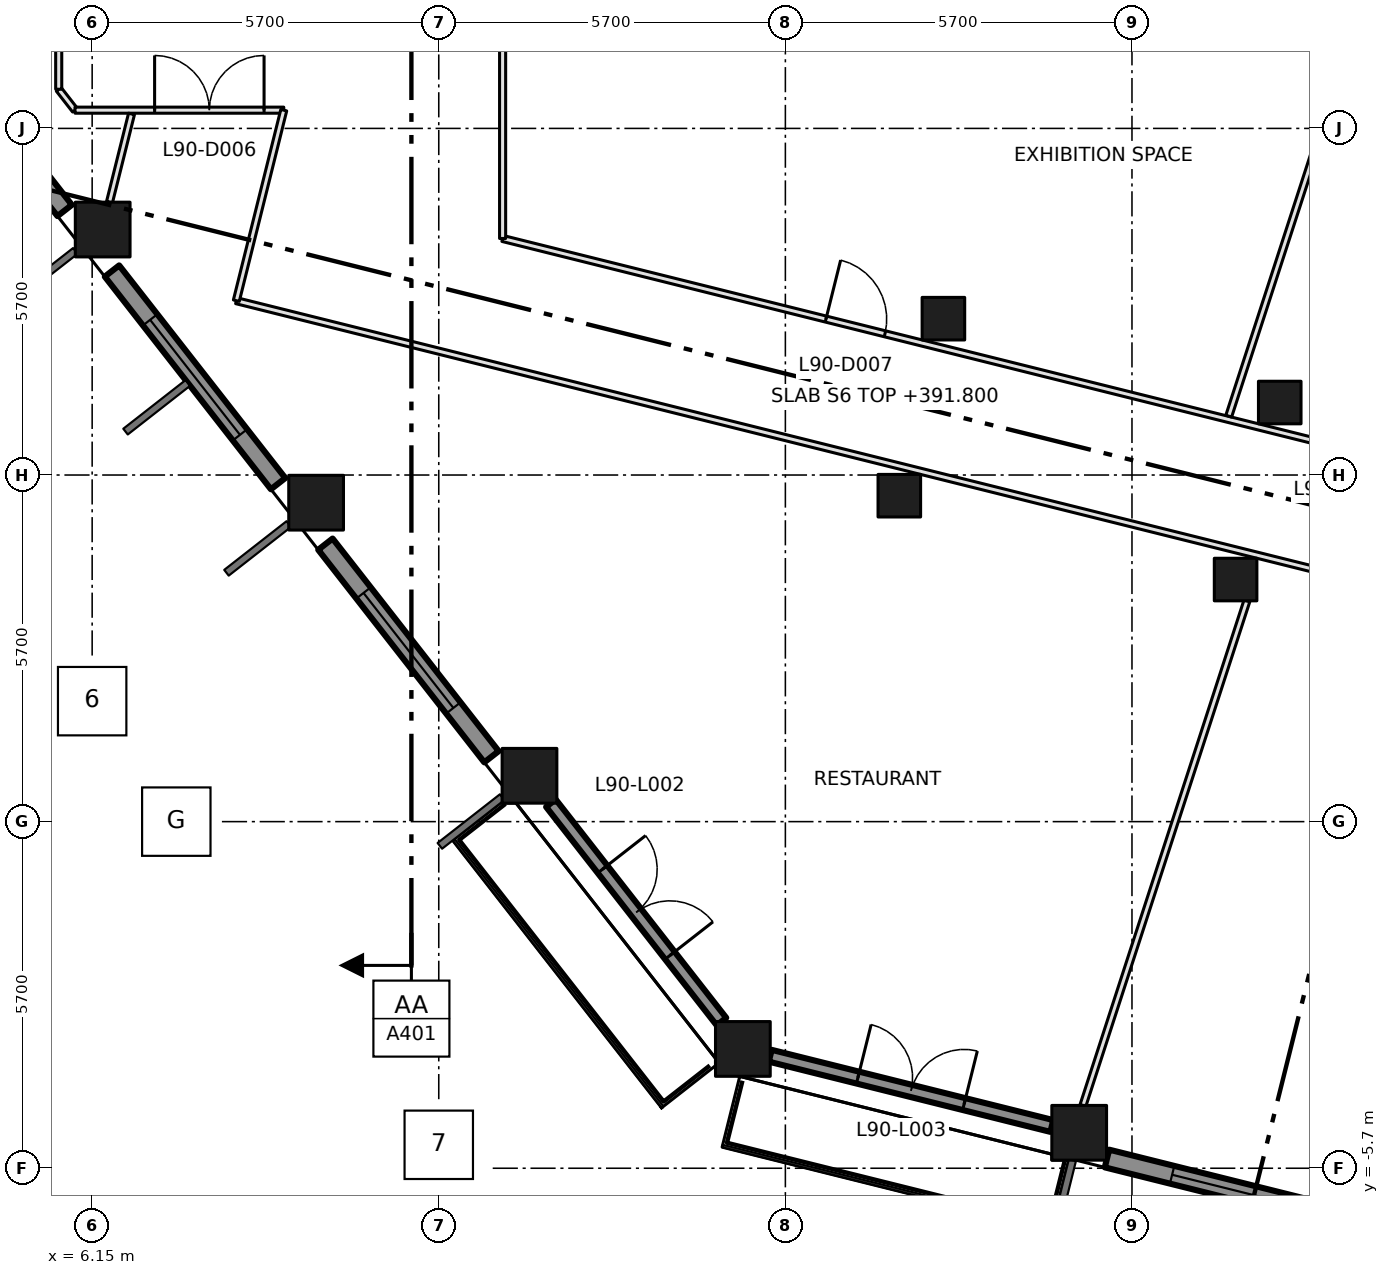
"""IFC4 building model, lengths in metres.
Left out: names, types, materials, properties, quantities, classifications, styles, units other than length and angle.
Written with IfcOpenShell. Run it as: python <this file> out.ifc"""

import sys

from ifc_helpers import new_model, si_unit, direction, frame, frame_2d, origin, origin_2d, place, context, subcontext, project, spatial, rectangle, extrude, element, fill, save


model = new_model("IFC4")
c1 = context("Model", 3, precision=1e-05, world=origin(), true_north=direction((0.0, 1.0)))
c2 = subcontext(c1, "Body", "Model", "MODEL_VIEW")
j1 = project(units=[si_unit("LENGTHUNIT", "METRE"), si_unit("PLANEANGLEUNIT", "RADIAN")], contexts=[c1])
p1 = place(None, origin())
s1 = spatial("IfcSite", under=j1, at=p1, CompositionType="ELEMENT")
p2 = place(p1, origin())
s2 = spatial("IfcBuilding", under=s1, at=p2, CompositionType="ELEMENT")
p3 = place(p2, frame((0.0, 0.0, 391.8)))
s3 = spatial("IfcBuildingStorey", under=s2, at=p3, CompositionType="ELEMENT", Elevation=391.8)
for number, where, z_axis, x_axis in (
    (1, (16.851, -3.738, 0.0), (0.0, 0.0, 1.0), (1.0, 0.0, 0.0)),
    (2, (13.342, 0.754, 0.0), (0.0, 0.0, 1.0), (1.0, 0.0, 0.0)),
    (3, (9.833, 5.245, 0.0), (0.0, 0.0, 1.0), (1.0, 0.0, 0.0)),
    (4, (6.323, 9.737, 0.0), (0.0, 0.0, 1.0), (1.0, 0.0, 0.0)),
    (5, (22.382, -5.117, 0.0), (0.0, 0.0, 1.0), (1.0, 0.0, 0.0)),
):
    element("IfcColumn", number, at=place(p3, frame(where, z_axis=z_axis, x_axis=x_axis)), inside=s3, PredefinedType="COLUMN", context=c2, shape_type="SweptSolid", body=[
        extrude(rectangle(XDim=0.9, YDim=0.9, at=origin_2d()), origin(), (0.0, 0.0, 1.0), 4.2),
    ])
for number, where, z_axis, x_axis in (
    (6, (19.424, 5.36, 0.0), (0.0, 0.0, 1.0), (1.0, 0.0, 0.0)),
    (7, (24.954, 3.981, 0.0), (0.0, 0.0, 1.0), (1.0, 0.0, 0.0)),
    (8, (20.149, 8.271, 0.0), (0.0, 0.0, 1.0), (1.0, 0.0, 0.0)),
    (9, (25.68, 6.892, 0.0), (0.0, 0.0, 1.0), (1.0, 0.0, 0.0)),
):
    element("IfcColumn", number, at=place(p3, frame(where, z_axis=z_axis, x_axis=x_axis)), inside=s3, PredefinedType="COLUMN", context=c2, shape_type="SweptSolid", body=[
        extrude(rectangle(XDim=0.7, YDim=0.7, at=origin_2d()), origin(), (0.0, 0.0, 1.0), 4.2),
    ])
p4 = place(p3, frame((2.967, 13.547, 0.0), z_axis=(0.0, 0.0, 1.0), x_axis=(0.615486001463, -0.788147817356, 0.0)))
e10 = element("IfcWall", 10, at=p4, inside=s3, PredefinedType="SOLIDWALL", context=c2, shape_type="SweptSolid", body=[
    extrude(rectangle(XDim=4.437, YDim=0.3, at=frame_2d((2.219, 0.0))), origin(), (0.0, 0.0, 1.0), 3.2),
])
p5 = place(p4, frame((1.018, 0.0, 0.8)))
e11 = element("IfcOpeningElement", 11, at=p5, cuts=e10, PredefinedType="OPENING", context=c2, shape_type="SweptSolid", body=[
    extrude(rectangle(XDim=2.4, YDim=2.1, at=frame_2d((1.2, 1.05))), frame((0.0, 0.16, 0.0), z_axis=(0.0, -1.0, 0.0), x_axis=(1.0, 0.0, 0.0)), (0.0, 0.0, 1.0), 0.32),
])
p6 = place(p3, frame((6.476, 9.055, 0.0), z_axis=(0.0, 0.0, 1.0), x_axis=(0.615649380255, -0.788020203162, 0.0)))
e12 = element("IfcWall", 12, at=p6, inside=s3, PredefinedType="SOLIDWALL", context=c2, shape_type="SweptSolid", body=[
    extrude(rectangle(XDim=4.438, YDim=0.3, at=frame_2d((2.219, 0.0))), origin(), (0.0, 0.0, 1.0), 3.2),
])
p7 = place(p6, frame((1.019, 0.0, 0.8)))
e13 = element("IfcOpeningElement", 13, at=p7, cuts=e12, PredefinedType="OPENING", context=c2, shape_type="SweptSolid", body=[
    extrude(rectangle(XDim=2.4, YDim=2.1, at=frame_2d((1.2, 1.05))), frame((0.0, 0.16, 0.0), z_axis=(0.0, -1.0, 0.0), x_axis=(1.0, 0.0, 0.0)), (0.0, 0.0, 1.0), 0.32),
])
p8 = place(p3, frame((9.986, 4.563, 0.0), z_axis=(0.0, 0.0, 1.0), x_axis=(0.615592779411, -0.788064419915, 0.0)))
e14 = element("IfcWall", 14, at=p8, inside=s3, PredefinedType="SOLIDWALL", context=c2, shape_type="SweptSolid", body=[
    extrude(rectangle(XDim=4.436, YDim=0.3, at=frame_2d((2.218, 0.0))), origin(), (0.0, 0.0, 1.0), 3.2),
])
p9 = place(p8, frame((1.018, 0.0, 0.8)))
e15 = element("IfcOpeningElement", 15, at=p9, cuts=e14, PredefinedType="OPENING", context=c2, shape_type="SweptSolid", body=[
    extrude(rectangle(XDim=2.4, YDim=2.1, at=frame_2d((1.2, 1.05))), frame((0.0, 0.16, 0.0), z_axis=(0.0, -1.0, 0.0), x_axis=(1.0, 0.0, 0.0)), (0.0, 0.0, 1.0), 0.32),
])
p10 = place(p3, frame((13.694, 0.304, 0.0), z_axis=(0.0, 0.0, 1.0), x_axis=(0.615460024179, -0.788168103033, 0.0)))
e16 = element("IfcWall", 16, at=p10, inside=s3, PredefinedType="SOLIDWALL", context=c2, shape_type="SweptSolid", body=[
    extrude(rectangle(XDim=4.557, YDim=0.2, at=frame_2d((2.279, 0.0))), origin(), (0.0, 0.0, 1.0), 3.2),
])
p11 = place(p10, frame((1.379, 0.0, 0.0)))
e17 = element("IfcOpeningElement", 17, at=p11, cuts=e16, PredefinedType="OPENING", context=c2, shape_type="SweptSolid", body=[
    extrude(rectangle(XDim=1.8, YDim=2.9, at=frame_2d((0.9, 1.45))), frame((0.0, 0.11, 0.0), z_axis=(0.0, -1.0, 0.0), x_axis=(1.0, 0.0, 0.0)), (0.0, 0.0, 1.0), 0.22),
])
p12 = place(p3, frame((12.398, -0.199, 0.0), z_axis=(0.0, 0.0, 1.0), x_axis=(0.615638738903, -0.788028516719, 0.0)))
e18 = element("IfcWall", 18, at=p12, inside=s3, PredefinedType="SOLIDWALL", context=c2, shape_type="SweptSolid", body=[
    extrude(rectangle(XDim=5.36, YDim=0.4, at=frame_2d((2.68, 0.0))), origin(), (0.0, 0.0, 1.0), 0.3),
])
p13 = place(p3, frame((17.301, -3.85, 0.0), z_axis=(0.0, 0.0, 1.0), x_axis=(0.970286762598, -0.241957844111, 0.0)))
e19 = element("IfcWall", 19, at=p13, inside=s3, PredefinedType="SOLIDWALL", context=c2, shape_type="SweptSolid", body=[
    extrude(rectangle(XDim=4.773, YDim=0.2, at=frame_2d((2.386, 0.0))), origin(), (0.0, 0.0, 1.0), 3.2),
])
p14 = place(p13, frame((1.486, 0.0, 0.0)))
e20 = element("IfcOpeningElement", 20, at=p14, cuts=e19, PredefinedType="OPENING", context=c2, shape_type="SweptSolid", body=[
    extrude(rectangle(XDim=1.8, YDim=2.9, at=frame_2d((0.9, 1.45))), frame((0.0, 0.11, 0.0), z_axis=(0.0, -1.0, 0.0), x_axis=(1.0, 0.0, 0.0)), (0.0, 0.0, 1.0), 0.22),
])
p15 = place(p3, frame((16.694, -5.069, 0.0), z_axis=(0.0, 0.0, 1.0), x_axis=(0.970289679319, -0.241946147329, 0.0)))
e21 = element("IfcWall", 21, at=p15, inside=s3, PredefinedType="SOLIDWALL", context=c2, shape_type="SweptSolid", body=[
    extrude(rectangle(XDim=5.36, YDim=0.4, at=frame_2d((2.68, 0.0))), origin(), (0.0, 0.0, 1.0), 0.3),
])
p16 = place(p3, frame((22.839, -5.54, 0.0), z_axis=(0.0, 0.0, 1.0), x_axis=(0.970282587769, -0.241974585177, 0.0)))
e22 = element("IfcWall", 22, at=p16, inside=s3, PredefinedType="SOLIDWALL", context=c2, shape_type="SweptSolid", body=[
    extrude(rectangle(XDim=4.608, YDim=0.3, at=frame_2d((2.304, 0.0))), origin(), (0.0, 0.0, 1.0), 3.2),
])
p17 = place(p16, frame((1.104, 0.0, 0.8)))
e23 = element("IfcOpeningElement", 23, at=p17, cuts=e22, PredefinedType="OPENING", context=c2, shape_type="SweptSolid", body=[
    extrude(rectangle(XDim=2.4, YDim=2.1, at=frame_2d((1.2, 1.05))), frame((0.0, 0.16, 0.0), z_axis=(0.0, -1.0, 0.0), x_axis=(1.0, 0.0, 0.0)), (0.0, 0.0, 1.0), 0.32),
])
p18 = place(p3, frame((5.6, 12.044, 0.0), z_axis=(0.0, 0.0, 1.0), x_axis=(0.614328236968, -0.789050579661, 0.0)))
e24 = element("IfcWall", 24, at=p18, inside=s3, PredefinedType="PARTITIONING", context=c2, shape_type="SweptSolid", body=[
    extrude(rectangle(XDim=0.436, YDim=0.1, at=frame_2d((0.218, 0.0))), origin(), (0.0, 0.0, 1.0), 3.9),
])
p19 = place(p3, frame((5.6, 39.77, 0.0), z_axis=(0.0, 0.0, 1.0), x_axis=(0.0, -1.0, 0.0)))
e25 = element("IfcWall", 25, at=p19, inside=s3, PredefinedType="PARTITIONING", context=c2, shape_type="SweptSolid", body=[
    extrude(rectangle(XDim=27.726, YDim=0.1, at=frame_2d((13.863, 0.0))), origin(), (0.0, 0.0, 1.0), 3.9),
])
p20 = place(p19, frame((24.295, 0.0, 0.0)))
e26 = element("IfcOpeningElement", 26, at=p20, cuts=e25, PredefinedType="OPENING", context=c2, shape_type="SweptSolid", body=[
    extrude(rectangle(XDim=1.0, YDim=2.1, at=frame_2d((0.5, 1.05))), frame((0.0, 0.06, 0.0), z_axis=(0.0, -1.0, 0.0), x_axis=(1.0, 0.0, 0.0)), (0.0, 0.0, 1.0), 0.12),
])
p21 = place(p19, frame((16.395, 0.0, 0.0)))
e27 = element("IfcOpeningElement", 27, at=p21, cuts=e25, PredefinedType="OPENING", context=c2, shape_type="SweptSolid", body=[
    extrude(rectangle(XDim=1.0, YDim=2.1, at=frame_2d((0.5, 1.05))), frame((0.0, 0.06, 0.0), z_axis=(0.0, -1.0, 0.0), x_axis=(1.0, 0.0, 0.0)), (0.0, 0.0, 1.0), 0.12),
])
p22 = place(p19, frame((7.995, 0.0, 0.0)))
e28 = element("IfcOpeningElement", 28, at=p22, cuts=e25, PredefinedType="OPENING", context=c2, shape_type="SweptSolid", body=[
    extrude(rectangle(XDim=1.0, YDim=2.1, at=frame_2d((0.5, 1.05))), frame((0.0, 0.06, 0.0), z_axis=(0.0, -1.0, 0.0), x_axis=(1.0, 0.0, 0.0)), (0.0, 0.0, 1.0), 0.12),
])
p23 = place(p19, frame((2.38, 0.0, 0.0)))
e29 = element("IfcOpeningElement", 29, at=p23, cuts=e25, PredefinedType="OPENING", context=c2, shape_type="SweptSolid", body=[
    extrude(rectangle(XDim=1.0, YDim=2.1, at=frame_2d((0.5, 1.05))), frame((0.0, 0.06, 0.0), z_axis=(0.0, -1.0, 0.0), x_axis=(1.0, 0.0, 0.0)), (0.0, 0.0, 1.0), 0.12),
])
p24 = place(p3, frame((5.868, 11.7, 0.0), z_axis=(0.0, 0.0, 1.0), x_axis=(1.0, 0.0, 0.0)))
e30 = element("IfcWall", 30, at=p24, inside=s3, PredefinedType="PARTITIONING", context=c2, shape_type="SweptSolid", body=[
    extrude(rectangle(XDim=3.433, YDim=0.1, at=frame_2d((1.717, 0.0))), origin(), (0.0, 0.0, 1.0), 3.9),
])
p25 = place(p24, frame((1.309, 0.0, 0.0)))
e31 = element("IfcOpeningElement", 31, at=p25, cuts=e30, PredefinedType="OPENING", context=c2, shape_type="SweptSolid", body=[
    extrude(rectangle(XDim=1.8, YDim=2.1, at=frame_2d((0.9, 1.05))), frame((0.0, 0.06, 0.0), z_axis=(0.0, -1.0, 0.0), x_axis=(1.0, 0.0, 0.0)), (0.0, 0.0, 1.0), 0.12),
])
p26 = place(p3, frame((8.521, 8.567, 0.0), z_axis=(0.0, 0.0, 1.0), x_axis=(0.970298072542, -0.241912485047, 0.0)))
e32 = element("IfcWall", 32, at=p26, inside=s3, PredefinedType="PARTITIONING", context=c2, shape_type="SweptSolid", body=[
    extrude(rectangle(XDim=39.274, YDim=0.1, at=frame_2d((19.637, 0.0))), origin(), (0.0, 0.0, 1.0), 3.9),
])
p27 = place(p26, frame((24.848, 0.0, 0.0)))
e33 = element("IfcOpeningElement", 33, at=p27, cuts=e32, PredefinedType="OPENING", context=c2, shape_type="SweptSolid", body=[
    extrude(rectangle(XDim=1.8, YDim=2.1, at=frame_2d((0.9, 1.05))), frame((0.0, 0.06, 0.0), z_axis=(0.0, -1.0, 0.0), x_axis=(1.0, 0.0, 0.0)), (0.0, 0.0, 1.0), 0.12),
])
p28 = place(p26, frame((30.448, 0.0, 0.0)))
e34 = element("IfcOpeningElement", 34, at=p28, cuts=e32, PredefinedType="OPENING", context=c2, shape_type="SweptSolid", body=[
    extrude(rectangle(XDim=1.0, YDim=2.1, at=frame_2d((0.5, 1.05))), frame((0.0, 0.06, 0.0), z_axis=(0.0, -1.0, 0.0), x_axis=(1.0, 0.0, 0.0)), (0.0, 0.0, 1.0), 0.12),
])
p29 = place(p3, frame((9.301, 11.7, 0.0), z_axis=(0.0, 0.0, 1.0), x_axis=(-0.241592536742, -0.970377785293, 0.0)))
e35 = element("IfcWall", 35, at=p29, inside=s3, PredefinedType="PARTITIONING", context=c2, shape_type="SweptSolid", body=[
    extrude(rectangle(XDim=3.229, YDim=0.1, at=frame_2d((1.614, 0.0))), origin(), (0.0, 0.0, 1.0), 3.9),
])
p30 = place(p3, frame((12.9, 9.59, 0.0), z_axis=(0.0, 0.0, 1.0), x_axis=(0.970296971371, -0.241916901741, 0.0)))
e36 = element("IfcWall", 36, at=p30, inside=s3, PredefinedType="PARTITIONING", context=c2, shape_type="SweptSolid", body=[
    extrude(rectangle(XDim=15.878, YDim=0.1, at=frame_2d((7.939, 0.0))), origin(), (0.0, 0.0, 1.0), 3.9),
])
p31 = place(p30, frame((5.48, 0.0, 0.0)))
e37 = element("IfcOpeningElement", 37, at=p31, cuts=e36, PredefinedType="OPENING", context=c2, shape_type="SweptSolid", body=[
    extrude(rectangle(XDim=1.0, YDim=2.1, at=frame_2d((0.5, 1.05))), frame((0.0, 0.06, 0.0), z_axis=(0.0, -1.0, 0.0), x_axis=(1.0, 0.0, 0.0)), (0.0, 0.0, 1.0), 0.12),
])
p32 = place(p30, frame((13.869, 0.0, 0.0)))
e38 = element("IfcOpeningElement", 38, at=p32, cuts=e36, PredefinedType="OPENING", context=c2, shape_type="SweptSolid", body=[
    extrude(rectangle(XDim=1.0, YDim=2.1, at=frame_2d((0.5, 1.05))), frame((0.0, 0.06, 0.0), z_axis=(0.0, -1.0, 0.0), x_axis=(1.0, 0.0, 0.0)), (0.0, 0.0, 1.0), 0.12),
])
p33 = place(p3, frame((12.9, 9.59, 0.0), z_axis=(0.0, 0.0, 1.0), x_axis=(0.0, 1.0, 0.0)))
e39 = element("IfcWall", 39, at=p33, inside=s3, PredefinedType="PARTITIONING", context=c2, shape_type="SweptSolid", body=[
    extrude(rectangle(XDim=4.51, YDim=0.1, at=frame_2d((2.255, 0.0))), origin(), (0.0, 0.0, 1.0), 3.9),
])
p34 = place(p3, frame((6.797, 11.638, 0.0), z_axis=(0.0, 0.0, 1.0), x_axis=(-0.242113049408, -0.970248046278, 0.0)))
e40 = element("IfcWall", 40, at=p34, inside=s3, PredefinedType="PARTITIONING", context=c2, shape_type="SweptSolid", body=[
    extrude(rectangle(XDim=1.495, YDim=0.1, at=frame_2d((0.748, 0.0))), origin(), (0.0, 0.0, 1.0), 3.9),
])
p35 = place(p3, frame((22.444, -4.667, 0.0), z_axis=(0.0, 0.0, 1.0), x_axis=(0.308974080069, 0.951070458928, 0.0)))
e41 = element("IfcWall", 41, at=p35, inside=s3, PredefinedType="PARTITIONING", context=c2, shape_type="SweptSolid", body=[
    extrude(rectangle(XDim=8.725, YDim=0.1, at=frame_2d((4.363, 0.0))), origin(), (0.0, 0.0, 1.0), 3.9),
])
p36 = place(p3, frame((24.841, 6.668, 0.0), z_axis=(0.0, 0.0, 1.0), x_axis=(0.308898149954, 0.951095122979, 0.0)))
e42 = element("IfcWall", 42, at=p36, inside=s3, PredefinedType="PARTITIONING", context=c2, shape_type="SweptSolid", body=[
    extrude(rectangle(XDim=7.814, YDim=0.1, at=frame_2d((3.907, 0.0))), origin(), (0.0, 0.0, 1.0), 3.9),
])
p37 = place(p7, origin())
e43 = element("IfcWindow", 43, at=p37, inside=s3, PartitioningType="DOUBLE_PANEL_VERTICAL", PredefinedType="WINDOW", context=c2, shape_type="SweptSolid", body=[
    extrude(rectangle(XDim=2.4, YDim=2.1, at=frame_2d((1.2, 1.05))), frame((0.0, 0.03, 0.0), z_axis=(0.0, -1.0, 0.0), x_axis=(1.0, 0.0, 0.0)), (0.0, 0.0, 1.0), 0.06),
])
fill(e13, e43)
p38 = place(p9, origin())
e44 = element("IfcWindow", 44, at=p38, inside=s3, PartitioningType="DOUBLE_PANEL_VERTICAL", PredefinedType="WINDOW", context=c2, shape_type="SweptSolid", body=[
    extrude(rectangle(XDim=2.4, YDim=2.1, at=frame_2d((1.2, 1.05))), frame((0.0, 0.03, 0.0), z_axis=(0.0, -1.0, 0.0), x_axis=(1.0, 0.0, 0.0)), (0.0, 0.0, 1.0), 0.06),
])
fill(e15, e44)
p39 = place(p11, origin())
e45 = element("IfcDoor", 45, at=p39, inside=s3, OperationType="DOUBLE_DOOR_SINGLE_SWING", PredefinedType="DOOR", context=c2, shape_type="SweptSolid", body=[
    extrude(rectangle(XDim=1.8, YDim=2.9, at=frame_2d((0.9, 1.45))), frame((0.0, 0.025, 0.0), z_axis=(0.0, -1.0, 0.0), x_axis=(1.0, 0.0, 0.0)), (0.0, 0.0, 1.0), 0.05),
])
fill(e17, e45)
p40 = place(p14, origin())
e46 = element("IfcDoor", 46, at=p40, inside=s3, OperationType="DOUBLE_DOOR_SINGLE_SWING", PredefinedType="DOOR", context=c2, shape_type="SweptSolid", body=[
    extrude(rectangle(XDim=1.8, YDim=2.9, at=frame_2d((0.9, 1.45))), frame((0.0, 0.025, 0.0), z_axis=(0.0, -1.0, 0.0), x_axis=(1.0, 0.0, 0.0)), (0.0, 0.0, 1.0), 0.05),
])
fill(e20, e46)
p41 = place(p17, origin())
e47 = element("IfcWindow", 47, at=p41, inside=s3, PartitioningType="DOUBLE_PANEL_VERTICAL", PredefinedType="WINDOW", context=c2, shape_type="SweptSolid", body=[
    extrude(rectangle(XDim=2.4, YDim=2.1, at=frame_2d((1.2, 1.05))), frame((0.0, 0.03, 0.0), z_axis=(0.0, -1.0, 0.0), x_axis=(1.0, 0.0, 0.0)), (0.0, 0.0, 1.0), 0.06),
])
fill(e23, e47)
p42 = place(p25, origin())
e48 = element("IfcDoor", 48, at=p42, inside=s3, OperationType="DOUBLE_DOOR_SINGLE_SWING", PredefinedType="DOOR", context=c2, shape_type="SweptSolid", body=[
    extrude(rectangle(XDim=1.8, YDim=2.1, at=frame_2d((0.9, 1.05))), frame((0.0, 0.025, 0.0), z_axis=(0.0, -1.0, 0.0), x_axis=(1.0, 0.0, 0.0)), (0.0, 0.0, 1.0), 0.05),
])
fill(e31, e48)
p43 = place(p31, origin())
e49 = element("IfcDoor", 49, at=p43, inside=s3, OperationType="SINGLE_SWING_LEFT", PredefinedType="DOOR", context=c2, shape_type="SweptSolid", body=[
    extrude(rectangle(XDim=1.0, YDim=2.1, at=frame_2d((0.5, 1.05))), frame((0.0, 0.025, 0.0), z_axis=(0.0, -1.0, 0.0), x_axis=(1.0, 0.0, 0.0)), (0.0, 0.0, 1.0), 0.05),
])
fill(e37, e49)
save(model, sys.argv[1])
